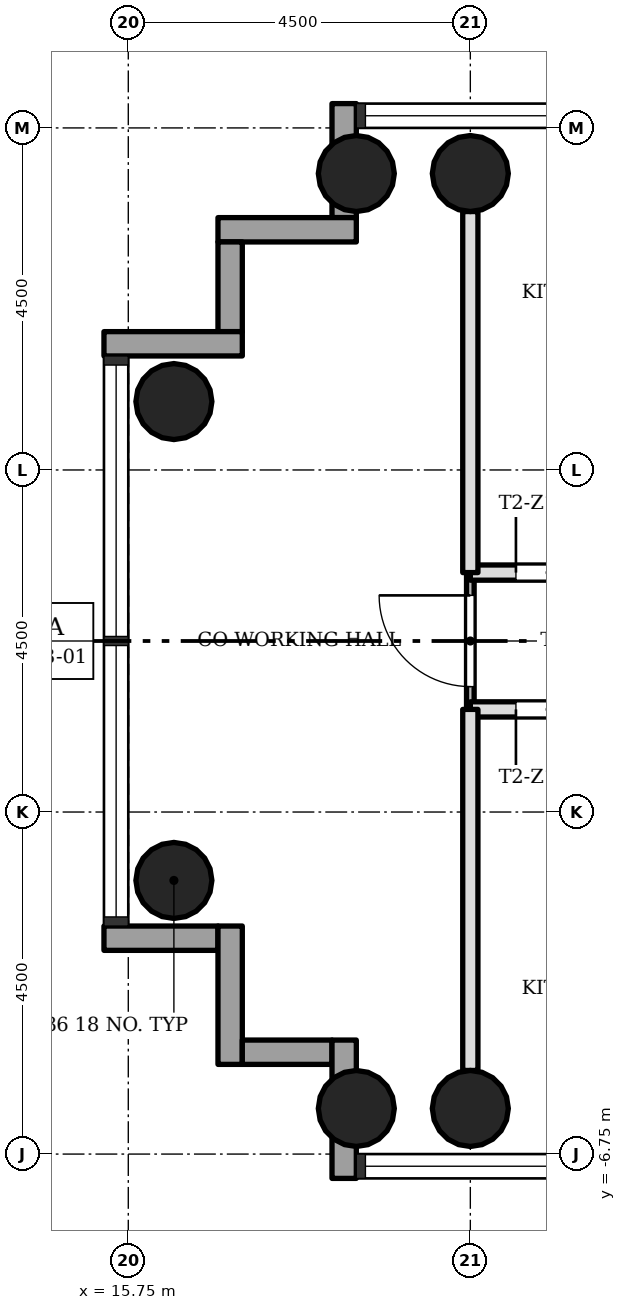
"""IFC4 building model, lengths in metres.
Left out: names, types, materials, properties, quantities, classifications, styles, units other than length and angle.
Written with IfcOpenShell. Run it as: python <this file> out.ifc"""

import sys

from ifc_helpers import new_model, si_unit, direction, frame, frame_2d, origin, origin_2d, place, context, subcontext, project, spatial, rectangle, hollow_circle, extrude, element, fill, save


model = new_model("IFC4")
c1 = context("Model", 3, precision=1e-05, world=origin(), true_north=direction((0.0, 1.0)))
c2 = subcontext(c1, "Body", "Model", "MODEL_VIEW")
j1 = project(units=[si_unit("LENGTHUNIT", "METRE"), si_unit("PLANEANGLEUNIT", "RADIAN")], contexts=[c1])
p1 = place(None, origin())
s1 = spatial("IfcSite", under=j1, at=p1, CompositionType="ELEMENT")
p2 = place(p1, origin())
s2 = spatial("IfcBuilding", under=s1, at=p2, CompositionType="ELEMENT")
p3 = place(p2, frame((0.0, 0.0, 41.5)))
s3 = spatial("IfcBuildingStorey", under=s2, at=p3, CompositionType="ELEMENT", Elevation=41.5)
for number, where, z_axis, x_axis in (
    (1, (20.25, 6.15, 0.0), (0.0, 0.0, 1.0), (1.0, 0.0, 0.0)),
    (2, (20.25, -6.15, 0.0), (0.0, 0.0, 1.0), (1.0, 0.0, 0.0)),
    (3, (18.75, 6.15, 0.0), (0.0, 0.0, 1.0), (1.0, 0.0, 0.0)),
    (4, (18.75, -6.15, 0.0), (0.0, 0.0, 1.0), (1.0, 0.0, 0.0)),
    (5, (16.35, 3.15, 0.0), (0.0, 0.0, 1.0), (1.0, 0.0, 0.0)),
    (6, (16.35, -3.15, 0.0), (0.0, 0.0, 1.0), (1.0, 0.0, 0.0)),
):
    element("IfcColumn", number, at=place(p3, frame(where, z_axis=z_axis, x_axis=x_axis)), inside=s3, PredefinedType="COLUMN", context=c2, shape_type="SweptSolid", body=[
        extrude(hollow_circle(Radius=0.5, WallThickness=0.036, at=origin_2d()), origin(), (0.0, 0.0, 1.0), 3.4),
    ])
p4 = place(p3, frame((18.59, 7.07, -0.3), z_axis=(0.0, 0.0, 1.0), x_axis=(0.0, -1.0, 0.0)))
e7 = element("IfcWall", 7, at=p4, inside=s3, PredefinedType="STANDARD", context=c2, shape_type="SweptSolid", body=[
    extrude(rectangle(XDim=1.5, YDim=0.32, at=frame_2d((0.75, 0.0))), origin(), (0.0, 0.0, 1.0), 3.4),
])
p5 = place(p3, frame((18.75, 5.41, -0.3), z_axis=(0.0, 0.0, 1.0), x_axis=(-1.0, 0.0, 0.0)))
e8 = element("IfcWall", 8, at=p5, inside=s3, PredefinedType="STANDARD", context=c2, shape_type="SweptSolid", body=[
    extrude(rectangle(XDim=1.82, YDim=0.32, at=frame_2d((0.91, 0.0))), origin(), (0.0, 0.0, 1.0), 3.4),
])
p6 = place(p3, frame((17.09, 5.25, -0.3), z_axis=(0.0, 0.0, 1.0), x_axis=(0.0, -1.0, 0.0)))
e9 = element("IfcWall", 9, at=p6, inside=s3, PredefinedType="STANDARD", context=c2, shape_type="SweptSolid", body=[
    extrude(rectangle(XDim=1.18, YDim=0.32, at=frame_2d((0.59, 0.0))), origin(), (0.0, 0.0, 1.0), 3.4),
])
p7 = place(p3, frame((17.25, 3.91, -0.3), z_axis=(0.0, 0.0, 1.0), x_axis=(-1.0, 0.0, 0.0)))
e10 = element("IfcWall", 10, at=p7, inside=s3, PredefinedType="STANDARD", context=c2, shape_type="SweptSolid", body=[
    extrude(rectangle(XDim=1.82, YDim=0.32, at=frame_2d((0.91, 0.0))), origin(), (0.0, 0.0, 1.0), 3.4),
])
p8 = place(p3, frame((15.43, -3.91, -0.3), z_axis=(0.0, 0.0, 1.0), x_axis=(1.0, 0.0, 0.0)))
e11 = element("IfcWall", 11, at=p8, inside=s3, PredefinedType="STANDARD", context=c2, shape_type="SweptSolid", body=[
    extrude(rectangle(XDim=1.5, YDim=0.32, at=frame_2d((0.75, 0.0))), origin(), (0.0, 0.0, 1.0), 3.4),
])
p9 = place(p3, frame((17.09, -3.75, -0.3), z_axis=(0.0, 0.0, 1.0), x_axis=(0.0, -1.0, 0.0)))
e12 = element("IfcWall", 12, at=p9, inside=s3, PredefinedType="STANDARD", context=c2, shape_type="SweptSolid", body=[
    extrude(rectangle(XDim=1.82, YDim=0.32, at=frame_2d((0.91, 0.0))), origin(), (0.0, 0.0, 1.0), 3.4),
])
p10 = place(p3, frame((17.25, -5.41, -0.3), z_axis=(0.0, 0.0, 1.0), x_axis=(1.0, 0.0, 0.0)))
e13 = element("IfcWall", 13, at=p10, inside=s3, PredefinedType="STANDARD", context=c2, shape_type="SweptSolid", body=[
    extrude(rectangle(XDim=1.18, YDim=0.32, at=frame_2d((0.59, 0.0))), origin(), (0.0, 0.0, 1.0), 3.4),
])
p11 = place(p3, frame((18.59, -5.25, -0.3), z_axis=(0.0, 0.0, 1.0), x_axis=(0.0, -1.0, 0.0)))
e14 = element("IfcWall", 14, at=p11, inside=s3, PredefinedType="STANDARD", context=c2, shape_type="SweptSolid", body=[
    extrude(rectangle(XDim=1.82, YDim=0.32, at=frame_2d((0.91, 0.0))), origin(), (0.0, 0.0, 1.0), 3.4),
])
p12 = place(p3, frame((24.75, -0.9, 0.0), z_axis=(0.0, 0.0, 1.0), x_axis=(-1.0, 0.0, 0.0)))
e15 = element("IfcWall", 15, at=p12, inside=s3, PredefinedType="SOLIDWALL", context=c2, shape_type="SweptSolid", body=[
    extrude(rectangle(XDim=4.5, YDim=0.2, at=frame_2d((2.25, 0.0))), origin(), (0.0, 0.0, 1.0), 3.0),
])
p13 = place(p12, frame((3.0, 0.0, 0.0)))
e16 = element("IfcOpeningElement", 16, at=p13, cuts=e15, PredefinedType="OPENING", context=c2, shape_type="SweptSolid", body=[
    extrude(rectangle(XDim=0.9, YDim=2.1, at=frame_2d((0.45, 1.05))), frame((0.0, 0.11, 0.0), z_axis=(0.0, -1.0, 0.0), x_axis=(1.0, 0.0, 0.0)), (0.0, 0.0, 1.0), 0.22),
])
p14 = place(p3, frame((24.75, 0.9, 0.0), z_axis=(0.0, 0.0, 1.0), x_axis=(-1.0, 0.0, 0.0)))
e17 = element("IfcWall", 17, at=p14, inside=s3, PredefinedType="SOLIDWALL", context=c2, shape_type="SweptSolid", body=[
    extrude(rectangle(XDim=4.5, YDim=0.2, at=frame_2d((2.25, 0.0))), origin(), (0.0, 0.0, 1.0), 3.0),
])
p15 = place(p14, frame((3.0, 0.0, 0.0)))
e18 = element("IfcOpeningElement", 18, at=p15, cuts=e17, PredefinedType="OPENING", context=c2, shape_type="SweptSolid", body=[
    extrude(rectangle(XDim=0.9, YDim=2.1, at=frame_2d((0.45, 1.05))), frame((0.0, 0.11, 0.0), z_axis=(0.0, -1.0, 0.0), x_axis=(1.0, 0.0, 0.0)), (0.0, 0.0, 1.0), 0.22),
])
p16 = place(p3, frame((20.25, -0.9, 0.0), z_axis=(0.0, 0.0, 1.0), x_axis=(0.0, 1.0, 0.0)))
e19 = element("IfcWall", 19, at=p16, inside=s3, PredefinedType="PARTITIONING", context=c2, shape_type="SweptSolid", body=[
    extrude(rectangle(XDim=1.8, YDim=0.1, at=frame_2d((0.9, 0.0))), origin(), (0.0, 0.0, 1.0), 3.0),
])
p17 = place(p16, frame((0.3, 0.0, 0.0)))
e20 = element("IfcOpeningElement", 20, at=p17, cuts=e19, PredefinedType="OPENING", context=c2, shape_type="SweptSolid", body=[
    extrude(rectangle(XDim=1.2, YDim=2.1, at=frame_2d((0.6, 1.05))), frame((0.0, 0.06, 0.0), z_axis=(0.0, -1.0, 0.0), x_axis=(1.0, 0.0, 0.0)), (0.0, 0.0, 1.0), 0.12),
])
for number, where, z_axis, x_axis in (
    (21, (20.25, -5.65, 0.0), (0.0, 0.0, 1.0), (0.0, 1.0, 0.0)),
    (22, (20.25, 0.9, 0.0), (0.0, 0.0, 1.0), (0.0, 1.0, 0.0)),
):
    element("IfcWall", number, at=place(p3, frame(where, z_axis=z_axis, x_axis=x_axis)), inside=s3, PredefinedType="SOLIDWALL", context=c2, shape_type="SweptSolid", body=[
        extrude(rectangle(XDim=4.75, YDim=0.2, at=frame_2d((2.375, 0.0))), origin(), (0.0, 0.0, 1.0), 3.0),
    ])
p18 = place(p13, origin())
e23 = element("IfcDoor", 23, at=p18, inside=s3, OperationType="SINGLE_SWING_LEFT", PredefinedType="DOOR", context=c2, shape_type="SweptSolid", body=[
    extrude(rectangle(XDim=0.9, YDim=2.1, at=frame_2d((0.45, 1.05))), frame((0.0, 0.025, 0.0), z_axis=(0.0, -1.0, 0.0), x_axis=(1.0, 0.0, 0.0)), (0.0, 0.0, 1.0), 0.05),
])
fill(e16, e23)
p19 = place(p15, origin())
e24 = element("IfcDoor", 24, at=p19, inside=s3, OperationType="SINGLE_SWING_RIGHT", PredefinedType="DOOR", context=c2, shape_type="SweptSolid", body=[
    extrude(rectangle(XDim=0.9, YDim=2.1, at=frame_2d((0.45, 1.05))), frame((0.0, 0.025, 0.0), z_axis=(0.0, -1.0, 0.0), x_axis=(1.0, 0.0, 0.0)), (0.0, 0.0, 1.0), 0.05),
])
fill(e18, e24)
p20 = place(p17, origin())
e25 = element("IfcDoor", 25, at=p20, inside=s3, OperationType="SINGLE_SWING_LEFT", PredefinedType="DOOR", context=c2, shape_type="SweptSolid", body=[
    extrude(rectangle(XDim=1.2, YDim=2.1, at=frame_2d((0.6, 1.05))), frame((0.0, 0.025, 0.0), z_axis=(0.0, -1.0, 0.0), x_axis=(1.0, 0.0, 0.0)), (0.0, 0.0, 1.0), 0.05),
])
fill(e20, e25)
save(model, sys.argv[1])
